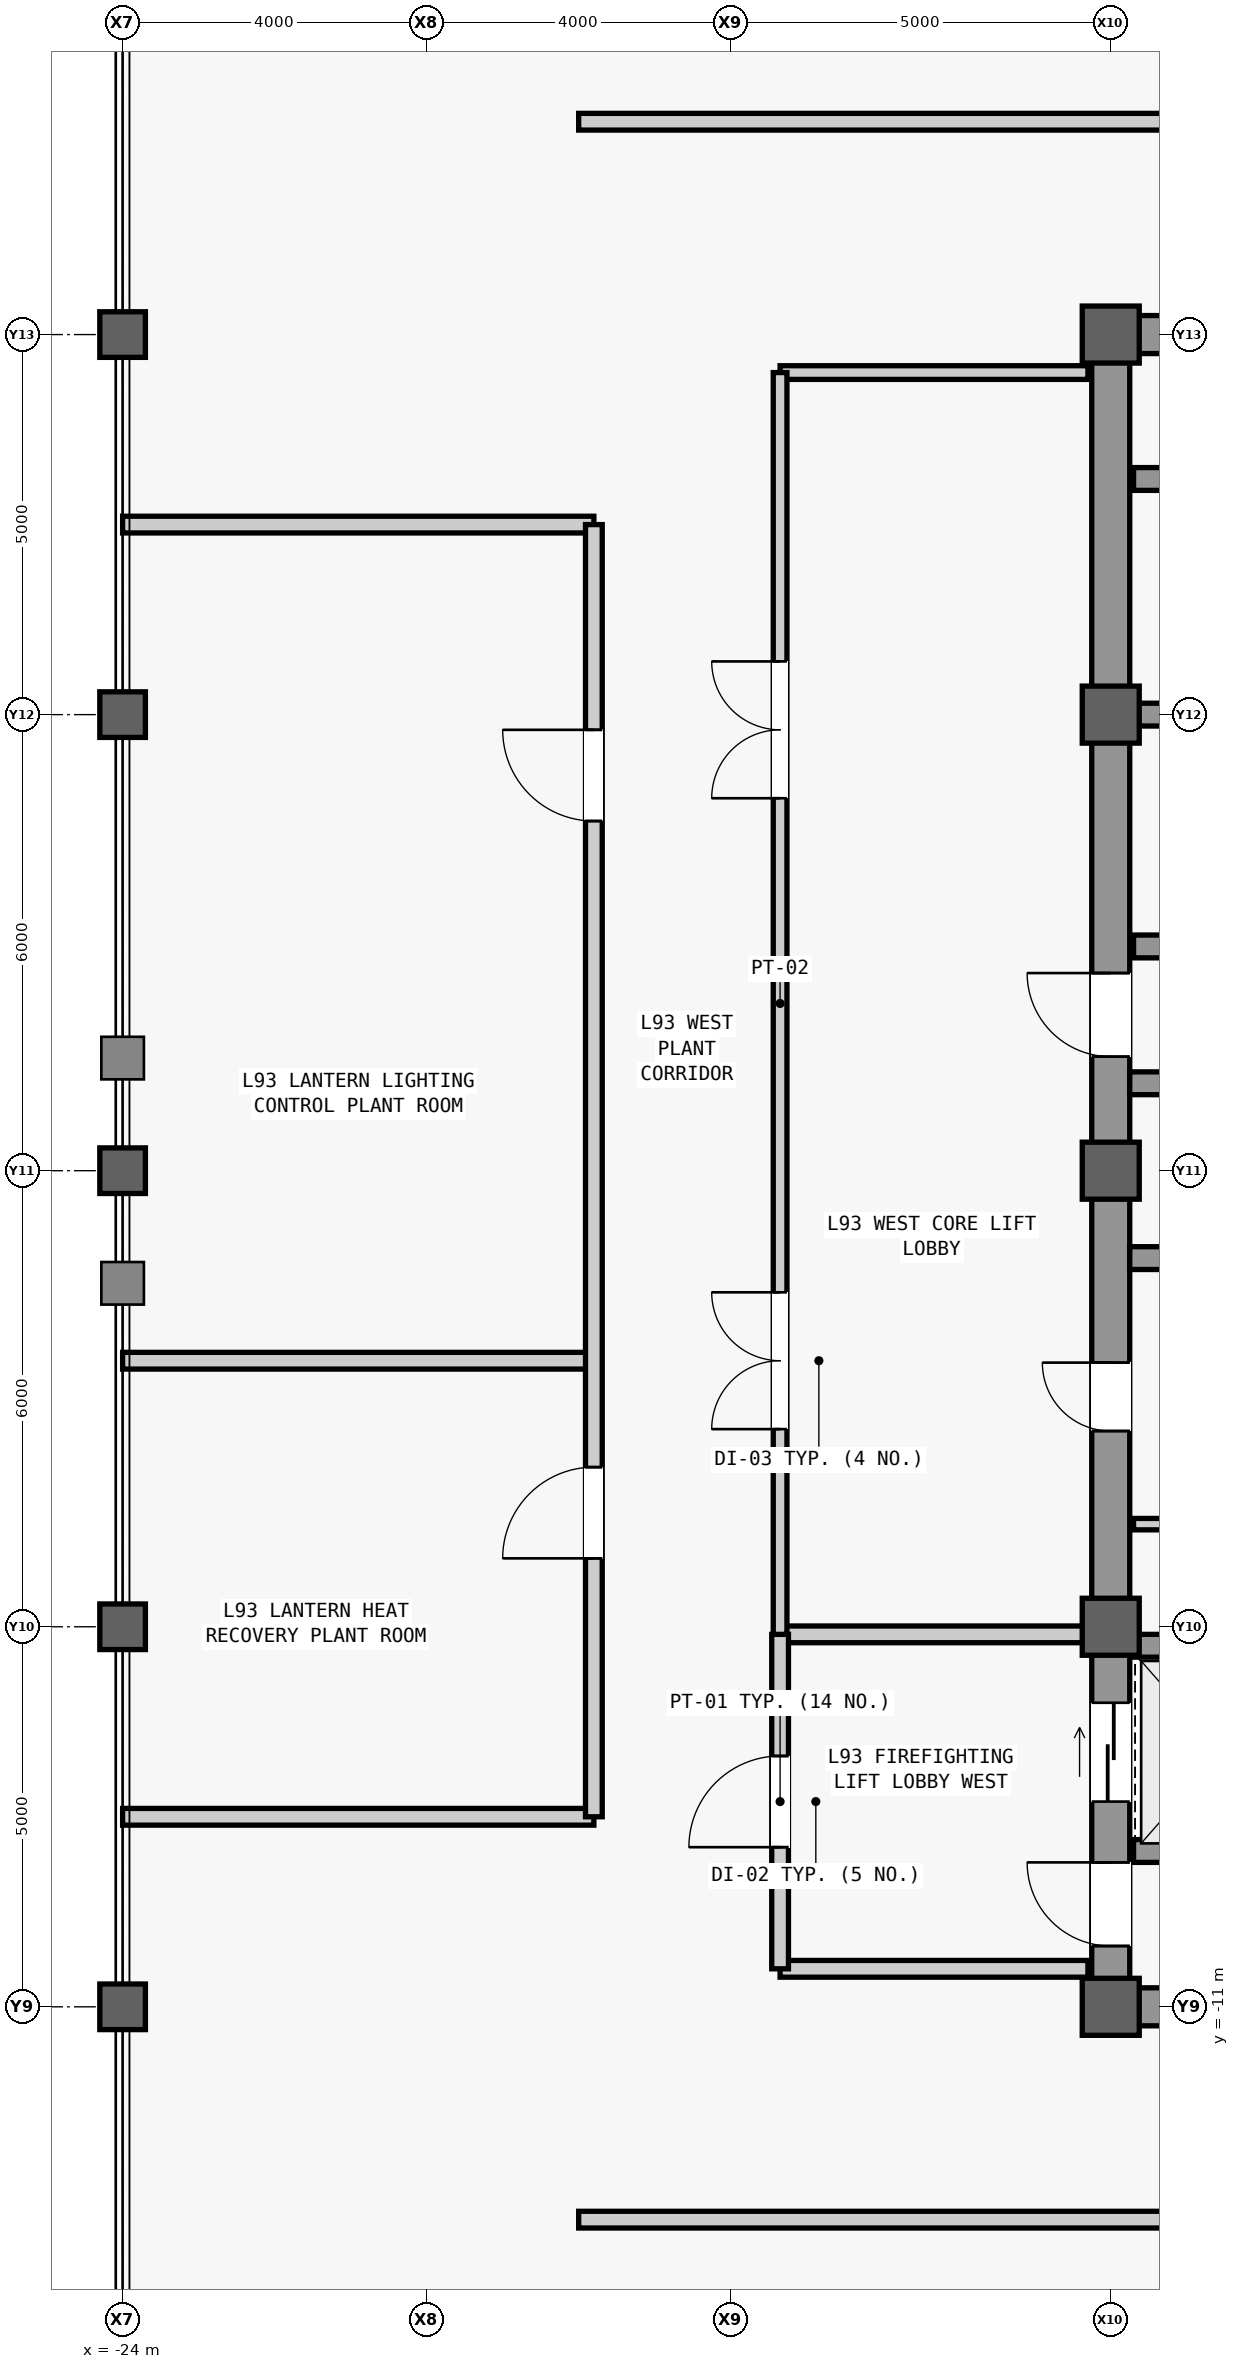
"""IFC4 building model, lengths in metres.
Left out: names, types, materials, properties, quantities, classifications, styles, units other than length and angle.
Written with IfcOpenShell. Run it as: python <this file> out.ifc"""

import sys

from ifc_helpers import new_model, si_unit, direction, frame, frame_2d, origin, origin_2d, place, context, subcontext, project, spatial, rectangle, hollow_rectangle, extrude, source, transform, mapped, element, fill, save


model = new_model("IFC4")
c1 = context("Model", 3, precision=1e-05, world=origin(), true_north=direction((0.0, 1.0)))
c2 = subcontext(c1, "Body", "Model", "MODEL_VIEW")
j1 = project(units=[si_unit("LENGTHUNIT", "METRE"), si_unit("PLANEANGLEUNIT", "RADIAN")], contexts=[c1])
p1 = place(None, origin())
s1 = spatial("IfcSite", under=j1, at=p1, CompositionType="ELEMENT")
p2 = place(p1, origin())
s2 = spatial("IfcBuilding", under=s1, at=p2, CompositionType="ELEMENT")
p3 = place(p2, frame((0.0, 0.0, 394.7)))
s3 = spatial("IfcBuildingStorey", under=s2, at=p3, CompositionType="ELEMENT", Elevation=394.7)
m1 = source(origin(), c2, "Body", "SweptSolid", [
    extrude(rectangle(XDim=22.0, YDim=0.5, at=frame_2d((11.0, 0.0))), origin(), (0.0, 0.0, 1.0), 4.45),
])
p4 = place(p3, frame((-11.0, -11.0, 0.0), z_axis=(0.0, 0.0, 1.0), x_axis=(0.0, 1.0, 0.0)))
e1 = element("IfcWall", 1, at=p4, inside=s3, PredefinedType="SHEAR", context=c2, shape_type="MappedRepresentation", body=[
    mapped(m1, transform((0.0, 0.0, 0.0), scale=1.0)),
])
m2 = source(origin(), c2, "Body", "SweptSolid", [
    extrude(rectangle(XDim=1.1, YDim=2.2, at=frame_2d((0.55, 1.1))), frame((0.0, 0.26, 0.0), z_axis=(0.0, -1.0, 0.0), x_axis=(1.0, 0.0, 0.0)), (0.0, 0.0, 1.0), 0.52),
])
p5 = place(p4, frame((0.8, 0.0, 0.0)))
e2 = element("IfcOpeningElement", 2, at=p5, cuts=e1, PredefinedType="OPENING", context=c2, shape_type="MappedRepresentation", body=[
    mapped(m2, transform((0.0, 0.0, 0.0), scale=1.0)),
])
p6 = place(p4, frame((12.5, 0.0, 0.0)))
e3 = element("IfcOpeningElement", 3, at=p6, cuts=e1, PredefinedType="OPENING", context=c2, shape_type="MappedRepresentation", body=[
    mapped(m2, transform((0.0, 0.0, 0.0), scale=1.0)),
])
m3 = source(origin(), c2, "Body", "SweptSolid", [
    extrude(rectangle(XDim=0.9, YDim=2.15, at=frame_2d((0.45, 1.075))), frame((0.0, 0.26, 0.0), z_axis=(0.0, -1.0, 0.0), x_axis=(1.0, 0.0, 0.0)), (0.0, 0.0, 1.0), 0.52),
])
p7 = place(p4, frame((7.575, 0.0, 0.0)))
e4 = element("IfcOpeningElement", 4, at=p7, cuts=e1, PredefinedType="OPENING", context=c2, shape_type="MappedRepresentation", body=[
    mapped(m3, transform((0.0, 0.0, 0.0), scale=1.0)),
])
m4 = source(origin(), c2, "Body", "SweptSolid", [
    extrude(rectangle(XDim=1.3, YDim=2.3, at=frame_2d((0.65, 1.15))), frame((0.0, 0.26, 0.0), z_axis=(0.0, -1.0, 0.0), x_axis=(1.0, 0.0, 0.0)), (0.0, 0.0, 1.0), 0.52),
])
p8 = place(p4, frame((2.7, 0.0, 0.0)))
e5 = element("IfcOpeningElement", 5, at=p8, cuts=e1, PredefinedType="OPENING", context=c2, shape_type="MappedRepresentation", body=[
    mapped(m4, transform((0.0, 0.0, 0.0), scale=1.0)),
])
m5 = source(origin(), c2, "Body", "SweptSolid", [
    extrude(rectangle(XDim=5.9, YDim=0.5, at=frame_2d((2.95, 0.0))), origin(), (0.0, 0.0, 1.0), 4.45),
])
for number, where, z_axis, x_axis in (
    (6, (-10.75, -11.0, 0.0), (0.0, 0.0, 1.0), (1.0, 0.0, 0.0)),
    (7, (-10.75, 11.0, 0.0), (0.0, 0.0, 1.0), (1.0, 0.0, 0.0)),
):
    element("IfcWall", number, at=place(p3, frame(where, z_axis=z_axis, x_axis=x_axis)), inside=s3, PredefinedType="SHEAR", context=c2, shape_type="MappedRepresentation", body=[
        mapped(m5, transform((0.0, 0.0, 0.0), scale=1.0)),
    ])
m6 = source(origin(), c2, "Body", "SweptSolid", [
    extrude(rectangle(XDim=5.65, YDim=0.3, at=frame_2d((2.825, 0.0))), origin(), (0.0, 0.0, 1.0), 4.45),
])
for number, where, z_axis, x_axis in (
    (8, (-10.75, -1.15, 0.0), (0.0, 0.0, 1.0), (1.0, 0.0, 0.0)),
    (9, (-10.75, 1.15, 0.0), (0.0, 0.0, 1.0), (1.0, 0.0, 0.0)),
):
    element("IfcWall", number, at=place(p3, frame(where, z_axis=z_axis, x_axis=x_axis)), inside=s3, PredefinedType="SHEAR", context=c2, shape_type="MappedRepresentation", body=[
        mapped(m6, transform((0.0, 0.0, 0.0), scale=1.0)),
    ])
m7 = source(origin(), c2, "Body", "SweptSolid", [
    extrude(hollow_rectangle(XDim=0.6, YDim=0.6, WallThickness=0.035, at=origin_2d()), origin(), (0.0, 0.0, 1.0), 4.8),
])
for number, where, z_axis, x_axis in (
    (10, (-24.0, -11.0, 0.0), (0.0, 0.0, 1.0), (1.0, 0.0, 0.0)),
    (11, (-24.0, -6.0, 0.0), (0.0, 0.0, 1.0), (1.0, 0.0, 0.0)),
    (12, (-24.0, 0.0, 0.0), (0.0, 0.0, 1.0), (1.0, 0.0, 0.0)),
    (13, (-24.0, 6.0, 0.0), (0.0, 0.0, 1.0), (1.0, 0.0, 0.0)),
    (14, (-24.0, 11.0, 0.0), (0.0, 0.0, 1.0), (1.0, 0.0, 0.0)),
):
    element("IfcColumn", number, at=place(p3, frame(where, z_axis=z_axis, x_axis=x_axis)), inside=s3, PredefinedType="COLUMN", context=c2, shape_type="MappedRepresentation", body=[
        mapped(m7, transform((0.0, 0.0, 0.0), scale=1.0)),
    ])
m8 = source(origin(), c2, "Body", "SweptSolid", [
    extrude(rectangle(XDim=0.75, YDim=0.75, at=origin_2d()), origin(), (0.0, 0.0, 1.0), 4.8),
])
for number, where, z_axis, x_axis in (
    (15, (-11.0, -11.0, 0.0), (0.0, 0.0, 1.0), (1.0, 0.0, 0.0)),
    (16, (-11.0, -6.0, 0.0), (0.0, 0.0, 1.0), (1.0, 0.0, 0.0)),
    (17, (-11.0, 0.0, 0.0), (0.0, 0.0, 1.0), (1.0, 0.0, 0.0)),
    (18, (-11.0, 6.0, 0.0), (0.0, 0.0, 1.0), (1.0, 0.0, 0.0)),
    (19, (-11.0, 11.0, 0.0), (0.0, 0.0, 1.0), (1.0, 0.0, 0.0)),
):
    element("IfcColumn", number, at=place(p3, frame(where, z_axis=z_axis, x_axis=x_axis)), inside=s3, PredefinedType="COLUMN", context=c2, shape_type="MappedRepresentation", body=[
        mapped(m8, transform((0.0, 0.0, 0.0), scale=1.0)),
    ])
m9 = source(origin(), c2, "Body", "SweptSolid", [
    extrude(rectangle(XDim=2.2, YDim=0.3, at=frame_2d((1.1, 0.0))), origin(), (0.0, 0.0, 1.0), 4.45),
])
for number, where, z_axis, x_axis in (
    (20, (-10.7, -8.95, 0.0), (0.0, 0.0, 1.0), (1.0, 0.0, 0.0)),
    (21, (-10.7, -6.25, 0.0), (0.0, 0.0, 1.0), (1.0, 0.0, 0.0)),
    (22, (-10.7, 2.95, 0.0), (0.0, 0.0, 1.0), (1.0, 0.0, 0.0)),
    (23, (-10.7, 6.0, 0.0), (0.0, 0.0, 1.0), (1.0, 0.0, 0.0)),
    (24, (-10.7, 9.1, 0.0), (0.0, 0.0, 1.0), (1.0, 0.0, 0.0)),
):
    element("IfcWall", number, at=place(p3, frame(where, z_axis=z_axis, x_axis=x_axis)), inside=s3, PredefinedType="SHEAR", context=c2, shape_type="MappedRepresentation", body=[
        mapped(m9, transform((0.0, 0.0, 0.0), scale=1.0)),
    ])
m10 = source(origin(), c2, "Body", "SweptSolid", [
    extrude(rectangle(XDim=2.05, YDim=0.15, at=frame_2d((1.025, 0.0))), origin(), (0.0, 0.0, 1.0), 4.45),
])
p9 = place(p3, frame((-10.7, -4.65, 0.0), z_axis=(0.0, 0.0, 1.0), x_axis=(1.0, 0.0, 0.0)))
e25 = element("IfcWall", 25, at=p9, inside=s3, PredefinedType="PARTITIONING", context=c2, shape_type="MappedRepresentation", body=[
    mapped(m10, transform((0.0, 0.0, 0.0), scale=1.0)),
])
m11 = source(origin(), c2, "Body", "SweptSolid", [
    extrude(rectangle(XDim=4.05, YDim=0.22, at=frame_2d((2.025, 0.0))), origin(), (0.0, 0.0, 1.0), 4.45),
])
p10 = place(p3, frame((-15.35, -10.5, 0.0), z_axis=(0.0, 0.0, 1.0), x_axis=(1.0, 0.0, 0.0)))
e26 = element("IfcWall", 26, at=p10, inside=s3, PredefinedType="PARTITIONING", context=c2, shape_type="MappedRepresentation", body=[
    mapped(m11, transform((0.0, 0.0, 0.0), scale=1.0)),
])
m12 = source(origin(), c2, "Body", "SweptSolid", [
    extrude(rectangle(XDim=4.05, YDim=0.22, at=frame_2d((2.025, 0.0))), origin(), (0.0, 0.0, 1.0), 3.901),
])
p11 = place(p3, frame((-15.35, -6.1, 0.0), z_axis=(0.0, 0.0, 1.0), x_axis=(1.0, 0.0, 0.0)))
e27 = element("IfcWall", 27, at=p11, inside=s3, PredefinedType="PARTITIONING", context=c2, shape_type="MappedRepresentation", body=[
    mapped(m12, transform((0.0, 0.0, 0.0), scale=1.0)),
])
m13 = source(origin(), c2, "Body", "SweptSolid", [
    extrude(rectangle(XDim=4.4, YDim=0.22, at=frame_2d((2.2, 0.0))), origin(), (0.0, 0.0, 1.0), 4.45),
])
p12 = place(p3, frame((-15.35, -10.5, 0.0), z_axis=(0.0, 0.0, 1.0), x_axis=(0.0, 1.0, 0.0)))
e28 = element("IfcWall", 28, at=p12, inside=s3, PredefinedType="PARTITIONING", context=c2, shape_type="MappedRepresentation", body=[
    mapped(m13, transform((0.0, 0.0, 0.0), scale=1.0)),
])
m14 = source(origin(), c2, "Body", "SweptSolid", [
    extrude(rectangle(XDim=1.2, YDim=2.2, at=frame_2d((0.6, 1.1))), frame((0.0, 0.12, 0.0), z_axis=(0.0, -1.0, 0.0), x_axis=(1.0, 0.0, 0.0)), (0.0, 0.0, 1.0), 0.24),
])
p13 = place(p12, frame((1.6, 0.0, 0.0)))
e29 = element("IfcOpeningElement", 29, at=p13, cuts=e28, PredefinedType="OPENING", context=c2, shape_type="MappedRepresentation", body=[
    mapped(m14, transform((0.0, 0.0, 0.0), scale=1.0)),
])
m15 = source(origin(), c2, "Body", "SweptSolid", [
    extrude(rectangle(XDim=4.05, YDim=0.18, at=frame_2d((2.025, 0.0))), origin(), (0.0, 0.0, 1.0), 4.45),
])
p14 = place(p3, frame((-15.35, 10.5, 0.0), z_axis=(0.0, 0.0, 1.0), x_axis=(1.0, 0.0, 0.0)))
e30 = element("IfcWall", 30, at=p14, inside=s3, PredefinedType="PARTITIONING", context=c2, shape_type="MappedRepresentation", body=[
    mapped(m15, transform((0.0, 0.0, 0.0), scale=1.0)),
])
m16 = source(origin(), c2, "Body", "SweptSolid", [
    extrude(rectangle(XDim=16.6, YDim=0.18, at=frame_2d((8.3, 0.0))), origin(), (0.0, 0.0, 1.0), 4.45),
])
p15 = place(p3, frame((-15.35, -6.1, 0.0), z_axis=(0.0, 0.0, 1.0), x_axis=(0.0, 1.0, 0.0)))
e31 = element("IfcWall", 31, at=p15, inside=s3, PredefinedType="PARTITIONING", context=c2, shape_type="MappedRepresentation", body=[
    mapped(m16, transform((0.0, 0.0, 0.0), scale=1.0)),
])
m17 = source(origin(), c2, "Body", "SweptSolid", [
    extrude(rectangle(XDim=1.8, YDim=2.25, at=frame_2d((0.9, 1.125))), frame((0.0, 0.1, 0.0), z_axis=(0.0, -1.0, 0.0), x_axis=(1.0, 0.0, 0.0)), (0.0, 0.0, 1.0), 0.2),
])
p16 = place(p15, frame((2.7, 0.0, 0.0)))
e32 = element("IfcOpeningElement", 32, at=p16, cuts=e31, PredefinedType="OPENING", context=c2, shape_type="MappedRepresentation", body=[
    mapped(m17, transform((0.0, 0.0, 0.0), scale=1.0)),
])
p17 = place(p15, frame((11.0, 0.0, 0.0)))
e33 = element("IfcOpeningElement", 33, at=p17, cuts=e31, PredefinedType="OPENING", context=c2, shape_type="MappedRepresentation", body=[
    mapped(m17, transform((0.0, 0.0, 0.0), scale=1.0)),
])
m18 = source(origin(), c2, "Body", "SweptSolid", [
    extrude(rectangle(XDim=36.0, YDim=0.22, at=frame_2d((18.0, 0.0))), origin(), (0.0, 0.0, 1.0), 4.45),
])
p18 = place(p3, frame((-18.0, -13.8, 0.0), z_axis=(0.0, 0.0, 1.0), x_axis=(1.0, 0.0, 0.0)))
e34 = element("IfcWall", 34, at=p18, inside=s3, PredefinedType="PARTITIONING", context=c2, shape_type="MappedRepresentation", body=[
    mapped(m18, transform((0.0, 0.0, 0.0), scale=1.0)),
])
m19 = source(origin(), c2, "Body", "SweptSolid", [
    extrude(rectangle(XDim=1.5, YDim=2.3, at=frame_2d((0.75, 1.15))), frame((0.0, 0.12, 0.0), z_axis=(0.0, -1.0, 0.0), x_axis=(1.0, 0.0, 0.0)), (0.0, 0.0, 1.0), 0.24),
])
p19 = place(p18, frame((12.4, 0.0, 0.0)))
e35 = element("IfcOpeningElement", 35, at=p19, cuts=e34, PredefinedType="OPENING", context=c2, shape_type="MappedRepresentation", body=[
    mapped(m19, transform((0.0, 0.0, 0.0), scale=1.0)),
])
p20 = place(p18, frame((25.4, 0.0, 0.0)))
e36 = element("IfcOpeningElement", 36, at=p20, cuts=e34, PredefinedType="OPENING", context=c2, shape_type="MappedRepresentation", body=[
    mapped(m19, transform((0.0, 0.0, 0.0), scale=1.0)),
])
p21 = place(p3, frame((-18.0, 13.8, 0.0), z_axis=(0.0, 0.0, 1.0), x_axis=(1.0, 0.0, 0.0)))
e37 = element("IfcWall", 37, at=p21, inside=s3, PredefinedType="PARTITIONING", context=c2, shape_type="MappedRepresentation", body=[
    mapped(m18, transform((0.0, 0.0, 0.0), scale=1.0)),
])
p22 = place(p21, frame((9.45, 0.0, 0.0)))
e38 = element("IfcOpeningElement", 38, at=p22, cuts=e37, PredefinedType="OPENING", context=c2, shape_type="MappedRepresentation", body=[
    mapped(m19, transform((0.0, 0.0, 0.0), scale=1.0)),
])
p23 = place(p21, frame((19.15, 0.0, 0.0)))
e39 = element("IfcOpeningElement", 39, at=p23, cuts=e37, PredefinedType="OPENING", context=c2, shape_type="MappedRepresentation", body=[
    mapped(m19, transform((0.0, 0.0, 0.0), scale=1.0)),
])
p24 = place(p21, frame((27.6, 0.0, 0.0)))
e40 = element("IfcOpeningElement", 40, at=p24, cuts=e37, PredefinedType="OPENING", context=c2, shape_type="MappedRepresentation", body=[
    mapped(m19, transform((0.0, 0.0, 0.0), scale=1.0)),
])
m20 = source(origin(), c2, "Body", "SweptSolid", [
    extrude(rectangle(XDim=6.2, YDim=0.22, at=frame_2d((3.1, 0.0))), origin(), (0.0, 0.0, 1.0), 4.45),
])
for number, where, z_axis, x_axis in (
    (41, (-24.0, -2.5, 0.0), (0.0, 0.0, 1.0), (1.0, 0.0, 0.0)),
    (42, (-24.0, -8.5, 0.0), (0.0, 0.0, 1.0), (1.0, 0.0, 0.0)),
    (43, (-24.0, 8.5, 0.0), (0.0, 0.0, 1.0), (1.0, 0.0, 0.0)),
):
    element("IfcWall", number, at=place(p3, frame(where, z_axis=z_axis, x_axis=x_axis)), inside=s3, PredefinedType="PARTITIONING", context=c2, shape_type="MappedRepresentation", body=[
        mapped(m20, transform((0.0, 0.0, 0.0), scale=1.0)),
    ])
m21 = source(origin(), c2, "Body", "SweptSolid", [
    extrude(rectangle(XDim=17.0, YDim=0.22, at=frame_2d((8.5, 0.0))), origin(), (0.0, 0.0, 1.0), 4.45),
])
p25 = place(p3, frame((-17.8, -8.5, 0.0), z_axis=(0.0, 0.0, 1.0), x_axis=(0.0, 1.0, 0.0)))
e44 = element("IfcWall", 44, at=p25, inside=s3, PredefinedType="PARTITIONING", context=c2, shape_type="MappedRepresentation", body=[
    mapped(m21, transform((0.0, 0.0, 0.0), scale=1.0)),
])
p26 = place(p25, frame((3.4, 0.0, 0.0)))
e45 = element("IfcOpeningElement", 45, at=p26, cuts=e44, PredefinedType="OPENING", context=c2, shape_type="MappedRepresentation", body=[
    mapped(m14, transform((0.0, 0.0, 0.0), scale=1.0)),
])
p27 = place(p25, frame((13.1, 0.0, 0.0)))
e46 = element("IfcOpeningElement", 46, at=p27, cuts=e44, PredefinedType="OPENING", context=c2, shape_type="MappedRepresentation", body=[
    mapped(m14, transform((0.0, 0.0, 0.0), scale=1.0)),
])
m22 = source(origin(), c2, "Body", "SweptSolid", [
    extrude(rectangle(XDim=1.1, YDim=2.2, at=frame_2d((0.55, 1.1))), frame((0.0, 0.025, 0.0), z_axis=(0.0, -1.0, 0.0), x_axis=(1.0, 0.0, 0.0)), (0.0, 0.0, 1.0), 0.05),
])
p28 = place(p5, origin())
e47 = element("IfcDoor", 47, at=p28, inside=s3, OperationType="SINGLE_SWING_RIGHT", PredefinedType="DOOR", context=c2, shape_type="MappedRepresentation", body=[
    mapped(m22, transform((0.0, 0.0, 0.0), scale=1.0)),
])
fill(e2, e47)
p29 = place(p6, origin())
e48 = element("IfcDoor", 48, at=p29, inside=s3, OperationType="SINGLE_SWING_RIGHT", PredefinedType="DOOR", context=c2, shape_type="MappedRepresentation", body=[
    mapped(m22, transform((0.0, 0.0, 0.0), scale=1.0)),
])
fill(e3, e48)
m23 = source(origin(), c2, "Body", "SweptSolid", [
    extrude(rectangle(XDim=0.9, YDim=2.15, at=frame_2d((0.45, 1.075))), frame((0.0, 0.025, 0.0), z_axis=(0.0, -1.0, 0.0), x_axis=(1.0, 0.0, 0.0)), (0.0, 0.0, 1.0), 0.05),
])
p30 = place(p7, origin())
e49 = element("IfcDoor", 49, at=p30, inside=s3, OperationType="SINGLE_SWING_RIGHT", PredefinedType="DOOR", context=c2, shape_type="MappedRepresentation", body=[
    mapped(m23, transform((0.0, 0.0, 0.0), scale=1.0)),
])
fill(e4, e49)
m24 = source(origin(), c2, "Body", "SweptSolid", [
    extrude(rectangle(XDim=1.2, YDim=2.2, at=frame_2d((0.6, 1.1))), frame((0.0, 0.025, 0.0), z_axis=(0.0, -1.0, 0.0), x_axis=(1.0, 0.0, 0.0)), (0.0, 0.0, 1.0), 0.05),
])
p31 = place(p13, origin())
e50 = element("IfcDoor", 50, at=p31, inside=s3, OperationType="SINGLE_SWING_LEFT", PredefinedType="DOOR", context=c2, shape_type="MappedRepresentation", body=[
    mapped(m24, transform((0.0, 0.0, 0.0), scale=1.0)),
])
fill(e29, e50)
m25 = source(origin(), c2, "Body", "SweptSolid", [
    extrude(rectangle(XDim=1.8, YDim=2.25, at=frame_2d((0.9, 1.125))), frame((0.0, 0.025, 0.0), z_axis=(0.0, -1.0, 0.0), x_axis=(1.0, 0.0, 0.0)), (0.0, 0.0, 1.0), 0.05),
])
p32 = place(p16, origin())
e51 = element("IfcDoor", 51, at=p32, inside=s3, OperationType="SINGLE_SWING_LEFT", PredefinedType="DOOR", context=c2, shape_type="MappedRepresentation", body=[
    mapped(m25, transform((0.0, 0.0, 0.0), scale=1.0)),
])
fill(e32, e51)
p33 = place(p17, origin())
e52 = element("IfcDoor", 52, at=p33, inside=s3, OperationType="SINGLE_SWING_RIGHT", PredefinedType="DOOR", context=c2, shape_type="MappedRepresentation", body=[
    mapped(m25, transform((0.0, 0.0, 0.0), scale=1.0)),
])
fill(e33, e52)
p34 = place(p26, origin())
e53 = element("IfcDoor", 53, at=p34, inside=s3, OperationType="SINGLE_SWING_LEFT", PredefinedType="DOOR", context=c2, shape_type="MappedRepresentation", body=[
    mapped(m24, transform((0.0, 0.0, 0.0), scale=1.0)),
])
fill(e45, e53)
p35 = place(p27, origin())
e54 = element("IfcDoor", 54, at=p35, inside=s3, OperationType="SINGLE_SWING_RIGHT", PredefinedType="DOOR", context=c2, shape_type="MappedRepresentation", body=[
    mapped(m24, transform((0.0, 0.0, 0.0), scale=1.0)),
])
fill(e46, e54)
m26 = source(origin(), c2, "Body", "SweptSolid", [
    extrude(rectangle(XDim=1.3, YDim=2.3, at=frame_2d((0.65, 1.15))), frame((0.0, 0.025, 0.0), z_axis=(0.0, -1.0, 0.0), x_axis=(1.0, 0.0, 0.0)), (0.0, 0.0, 1.0), 0.05),
])
p36 = place(p8, origin())
e55 = element("IfcDoor", 55, at=p36, inside=s3, OperationType="SLIDING_TO_LEFT", PredefinedType="DOOR", context=c2, shape_type="MappedRepresentation", body=[
    mapped(m26, transform((0.0, 0.0, 0.0), scale=1.0)),
])
fill(e5, e55)
save(model, sys.argv[1])
